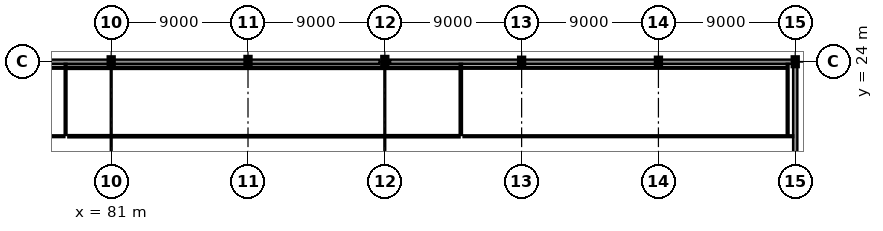
"""IFC4 building model, lengths in metres.
Left out: names, types, materials, properties, quantities, classifications, styles, units other than length and angle.
Written with IfcOpenShell. Run it as: python <this file> out.ifc"""

import sys

from ifc_helpers import new_model, si_unit, direction, frame, frame_2d, origin, origin_2d, place, context, subcontext, project, spatial, rectangle, i_section, extrude, element, fill, save


model = new_model("IFC4")
c1 = context("Model", 3, precision=1e-05, world=origin(), true_north=direction((0.0, 1.0)))
c2 = subcontext(c1, "Body", "Model", "MODEL_VIEW")
j1 = project(units=[si_unit("LENGTHUNIT", "METRE"), si_unit("PLANEANGLEUNIT", "RADIAN")], contexts=[c1])
p1 = place(None, origin())
s1 = spatial("IfcSite", under=j1, at=p1, CompositionType="ELEMENT")
p2 = place(p1, origin())
s2 = spatial("IfcBuilding", under=s1, at=p2, CompositionType="ELEMENT")
p3 = place(p2, frame((0.0, 0.0, 27.4)))
s3 = spatial("IfcBuildingStorey", under=s2, at=p3, CompositionType="ELEMENT", Elevation=27.4)
p4 = place(p3, frame((81.0, 24.0, 0.0), z_axis=(0.0, 0.0, 1.0), x_axis=(1.0, 0.0, 0.0)))
e1 = element("IfcColumn", 1, at=p4, inside=s3, PredefinedType="COLUMN", context=c2, shape_type="SweptSolid", body=[
    extrude(i_section(OverallWidth=0.3, OverallDepth=0.55, WebThickness=0.015, FlangeThickness=0.029, at=origin_2d()), origin(), (0.0, 0.0, 1.0), 4.0),
])
for number, where, z_axis, x_axis in (
    (2, (90.0, 24.0, 0.0), (0.0, 0.0, 1.0), (1.0, 0.0, 0.0)),
    (3, (99.0, 24.0, 0.0), (0.0, 0.0, 1.0), (0.0, 1.0, 0.0)),
):
    element("IfcColumn", number, at=place(p3, frame(where, z_axis=z_axis, x_axis=x_axis)), inside=s3, PredefinedType="COLUMN", context=c2, shape_type="SweptSolid", body=[
        extrude(i_section(OverallWidth=0.3, OverallDepth=0.6, WebThickness=0.015, FlangeThickness=0.03, at=origin_2d()), origin(), (0.0, 0.0, 1.0), 4.0),
    ])
for number, where, z_axis, x_axis in (
    (4, (108.0, 24.0, 0.0), (0.0, 0.0, 1.0), (1.0, 0.0, 0.0)),
    (5, (117.0, 24.0, 0.0), (0.0, 0.0, 1.0), (1.0, 0.0, 0.0)),
):
    element("IfcColumn", number, at=place(p3, frame(where, z_axis=z_axis, x_axis=x_axis)), inside=s3, PredefinedType="COLUMN", context=c2, shape_type="SweptSolid", body=[
        extrude(i_section(OverallWidth=0.3, OverallDepth=0.5, WebThickness=0.014, FlangeThickness=0.028, at=origin_2d()), origin(), (0.0, 0.0, 1.0), 4.0),
    ])
p5 = place(p3, frame((126.0, 24.0, 0.0), z_axis=(0.0, 0.0, 1.0), x_axis=(1.0, 0.0, 0.0)))
e6 = element("IfcColumn", 6, at=p5, inside=s3, PredefinedType="COLUMN", context=c2, shape_type="SweptSolid", body=[
    extrude(i_section(OverallWidth=0.3, OverallDepth=0.55, WebThickness=0.015, FlangeThickness=0.029, at=origin_2d()), origin(), (0.0, 0.0, 1.0), 4.0),
])
p6 = place(p3, frame((80.942, 24.0, 0.0), z_axis=(0.0, 0.0, 1.0), x_axis=(-1.0, 0.0, 0.0)))
e7 = element("IfcWall", 7, at=p6, inside=s3, PredefinedType="SOLIDWALL", context=c2, shape_type="SweptSolid", body=[
    extrude(rectangle(XDim=8.934, YDim=0.28, at=frame_2d((4.467, 0.0))), origin(), (0.0, 0.0, 1.0), 3.305),
])
p7 = place(p6, frame((1.302, 0.0, 1.05)))
e8 = element("IfcOpeningElement", 8, at=p7, cuts=e7, PredefinedType="OPENING", context=c2, shape_type="SweptSolid", body=[
    extrude(rectangle(XDim=1.3, YDim=1.3, at=frame_2d((0.65, 0.65))), frame((0.0, 0.155, 0.0), z_axis=(0.0, -1.0, 0.0), x_axis=(1.0, 0.0, 0.0)), (0.0, 0.0, 1.0), 0.31),
])
p8 = place(p6, frame((5.604, 0.0, 1.05)))
e9 = element("IfcOpeningElement", 9, at=p8, cuts=e7, PredefinedType="OPENING", context=c2, shape_type="SweptSolid", body=[
    extrude(rectangle(XDim=1.3, YDim=1.3, at=frame_2d((0.65, 0.65))), frame((0.0, 0.155, 0.0), z_axis=(0.0, -1.0, 0.0), x_axis=(1.0, 0.0, 0.0)), (0.0, 0.0, 1.0), 0.31),
])
p9 = place(p3, frame((98.652, 24.0, 0.0), z_axis=(0.0, 0.0, 1.0), x_axis=(-1.0, 0.0, 0.0)))
e10 = element("IfcWall", 10, at=p9, inside=s3, PredefinedType="SOLIDWALL", context=c2, shape_type="SweptSolid", body=[
    extrude(rectangle(XDim=8.644, YDim=0.28, at=frame_2d((4.322, 0.0))), origin(), (0.0, 0.0, 1.0), 3.305),
])
p10 = place(p9, frame((1.943, 0.0, 1.05)))
e11 = element("IfcOpeningElement", 11, at=p10, cuts=e10, PredefinedType="OPENING", context=c2, shape_type="SweptSolid", body=[
    extrude(rectangle(XDim=1.3, YDim=1.3, at=frame_2d((0.65, 0.65))), frame((0.0, 0.155, 0.0), z_axis=(0.0, -1.0, 0.0), x_axis=(1.0, 0.0, 0.0)), (0.0, 0.0, 1.0), 0.31),
])
p11 = place(p9, frame((5.401, 0.0, 1.05)))
e12 = element("IfcOpeningElement", 12, at=p11, cuts=e10, PredefinedType="OPENING", context=c2, shape_type="SweptSolid", body=[
    extrude(rectangle(XDim=1.3, YDim=1.3, at=frame_2d((0.65, 0.65))), frame((0.0, 0.155, 0.0), z_axis=(0.0, -1.0, 0.0), x_axis=(1.0, 0.0, 0.0)), (0.0, 0.0, 1.0), 0.31),
])
p12 = place(p3, frame((89.992, 24.0, 0.0), z_axis=(0.0, 0.0, 1.0), x_axis=(-1.0, 0.0, 0.0)))
e13 = element("IfcWall", 13, at=p12, inside=s3, PredefinedType="SOLIDWALL", context=c2, shape_type="SweptSolid", body=[
    extrude(rectangle(XDim=8.934, YDim=0.28, at=frame_2d((4.467, 0.0))), origin(), (0.0, 0.0, 1.0), 3.305),
])
p13 = place(p12, frame((2.03, 0.0, 1.05)))
e14 = element("IfcOpeningElement", 14, at=p13, cuts=e13, PredefinedType="OPENING", context=c2, shape_type="SweptSolid", body=[
    extrude(rectangle(XDim=1.3, YDim=1.3, at=frame_2d((0.65, 0.65))), frame((0.0, 0.155, 0.0), z_axis=(0.0, -1.0, 0.0), x_axis=(1.0, 0.0, 0.0)), (0.0, 0.0, 1.0), 0.31),
])
p14 = place(p12, frame((5.604, 0.0, 1.05)))
e15 = element("IfcOpeningElement", 15, at=p14, cuts=e13, PredefinedType="OPENING", context=c2, shape_type="SweptSolid", body=[
    extrude(rectangle(XDim=1.3, YDim=1.3, at=frame_2d((0.65, 0.65))), frame((0.0, 0.155, 0.0), z_axis=(0.0, -1.0, 0.0), x_axis=(1.0, 0.0, 0.0)), (0.0, 0.0, 1.0), 0.31),
])
p15 = place(p3, frame((126.0, 12.138, 0.0), z_axis=(0.0, 0.0, 1.0), x_axis=(0.0, 1.0, 0.0)))
e16 = element("IfcWall", 16, at=p15, inside=s3, PredefinedType="SOLIDWALL", context=c2, shape_type="SweptSolid", body=[
    extrude(rectangle(XDim=11.589, YDim=0.28, at=frame_2d((5.794, 0.0))), origin(), (0.0, 0.0, 1.0), 3.305),
])
p16 = place(p15, frame((2.022, 0.0, 1.05)))
e17 = element("IfcOpeningElement", 17, at=p16, cuts=e16, PredefinedType="OPENING", context=c2, shape_type="SweptSolid", body=[
    extrude(rectangle(XDim=1.3, YDim=1.3, at=frame_2d((0.65, 0.65))), frame((0.0, 0.155, 0.0), z_axis=(0.0, -1.0, 0.0), x_axis=(1.0, 0.0, 0.0)), (0.0, 0.0, 1.0), 0.31),
])
p17 = place(p15, frame((7.462, 0.0, 1.05)))
e18 = element("IfcOpeningElement", 18, at=p17, cuts=e16, PredefinedType="OPENING", context=c2, shape_type="SweptSolid", body=[
    extrude(rectangle(XDim=1.3, YDim=1.3, at=frame_2d((0.65, 0.65))), frame((0.0, 0.155, 0.0), z_axis=(0.0, -1.0, 0.0), x_axis=(1.0, 0.0, 0.0)), (0.0, 0.0, 1.0), 0.31),
])
p18 = place(p3, frame((125.992, 24.0, 0.0), z_axis=(0.0, 0.0, 1.0), x_axis=(-1.0, 0.0, 0.0)))
e19 = element("IfcWall", 19, at=p18, inside=s3, PredefinedType="SOLIDWALL", context=c2, shape_type="SweptSolid", body=[
    extrude(rectangle(XDim=8.984, YDim=0.28, at=frame_2d((4.492, 0.0))), origin(), (0.0, 0.0, 1.0), 3.305),
])
p19 = place(p18, frame((2.045, 0.0, 1.05)))
e20 = element("IfcOpeningElement", 20, at=p19, cuts=e19, PredefinedType="OPENING", context=c2, shape_type="SweptSolid", body=[
    extrude(rectangle(XDim=1.3, YDim=1.3, at=frame_2d((0.65, 0.65))), frame((0.0, 0.155, 0.0), z_axis=(0.0, -1.0, 0.0), x_axis=(1.0, 0.0, 0.0)), (0.0, 0.0, 1.0), 0.31),
])
p20 = place(p18, frame((5.639, 0.0, 1.05)))
e21 = element("IfcOpeningElement", 21, at=p20, cuts=e19, PredefinedType="OPENING", context=c2, shape_type="SweptSolid", body=[
    extrude(rectangle(XDim=1.3, YDim=1.3, at=frame_2d((0.65, 0.65))), frame((0.0, 0.155, 0.0), z_axis=(0.0, -1.0, 0.0), x_axis=(1.0, 0.0, 0.0)), (0.0, 0.0, 1.0), 0.31),
])
p21 = place(p3, frame((116.992, 24.0, 0.0), z_axis=(0.0, 0.0, 1.0), x_axis=(-1.0, 0.0, 0.0)))
e22 = element("IfcWall", 22, at=p21, inside=s3, PredefinedType="SOLIDWALL", context=c2, shape_type="SweptSolid", body=[
    extrude(rectangle(XDim=8.984, YDim=0.28, at=frame_2d((4.492, 0.0))), origin(), (0.0, 0.0, 1.0), 3.305),
])
p22 = place(p21, frame((2.045, 0.0, 1.05)))
e23 = element("IfcOpeningElement", 23, at=p22, cuts=e22, PredefinedType="OPENING", context=c2, shape_type="SweptSolid", body=[
    extrude(rectangle(XDim=1.3, YDim=1.3, at=frame_2d((0.65, 0.65))), frame((0.0, 0.155, 0.0), z_axis=(0.0, -1.0, 0.0), x_axis=(1.0, 0.0, 0.0)), (0.0, 0.0, 1.0), 0.31),
])
p23 = place(p21, frame((5.639, 0.0, 1.05)))
e24 = element("IfcOpeningElement", 24, at=p23, cuts=e22, PredefinedType="OPENING", context=c2, shape_type="SweptSolid", body=[
    extrude(rectangle(XDim=1.3, YDim=1.3, at=frame_2d((0.65, 0.65))), frame((0.0, 0.155, 0.0), z_axis=(0.0, -1.0, 0.0), x_axis=(1.0, 0.0, 0.0)), (0.0, 0.0, 1.0), 0.31),
])
p24 = place(p3, frame((107.992, 24.0, 0.0), z_axis=(0.0, 0.0, 1.0), x_axis=(-1.0, 0.0, 0.0)))
e25 = element("IfcWall", 25, at=p24, inside=s3, PredefinedType="SOLIDWALL", context=c2, shape_type="SweptSolid", body=[
    extrude(rectangle(XDim=8.644, YDim=0.28, at=frame_2d((4.322, 0.0))), origin(), (0.0, 0.0, 1.0), 3.305),
])
p25 = place(p24, frame((1.943, 0.0, 1.05)))
e26 = element("IfcOpeningElement", 26, at=p25, cuts=e25, PredefinedType="OPENING", context=c2, shape_type="SweptSolid", body=[
    extrude(rectangle(XDim=1.3, YDim=1.3, at=frame_2d((0.65, 0.65))), frame((0.0, 0.155, 0.0), z_axis=(0.0, -1.0, 0.0), x_axis=(1.0, 0.0, 0.0)), (0.0, 0.0, 1.0), 0.31),
])
p26 = place(p24, frame((5.401, 0.0, 1.05)))
e27 = element("IfcOpeningElement", 27, at=p26, cuts=e25, PredefinedType="OPENING", context=c2, shape_type="SweptSolid", body=[
    extrude(rectangle(XDim=1.3, YDim=1.3, at=frame_2d((0.65, 0.65))), frame((0.0, 0.155, 0.0), z_axis=(0.0, -1.0, 0.0), x_axis=(1.0, 0.0, 0.0)), (0.0, 0.0, 1.0), 0.31),
])
p27 = place(p3, frame((77.92, 19.1, 0.0), z_axis=(0.0, 0.0, 1.0), x_axis=(-1.0, 0.0, 0.0)))
e28 = element("IfcWall", 28, at=p27, inside=s3, PredefinedType="PARTITIONING", context=c2, shape_type="SweptSolid", body=[
    extrude(rectangle(XDim=45.385, YDim=0.12, at=frame_2d((22.692, 0.0))), origin(), (0.0, 0.0, 1.0), 3.64),
])
p28 = place(p27, frame((22.218, 0.0, 0.0)))
e29 = element("IfcOpeningElement", 29, at=p28, cuts=e28, PredefinedType="OPENING", context=c2, shape_type="SweptSolid", body=[
    extrude(rectangle(XDim=0.95, YDim=2.15, at=frame_2d((0.475, 1.075))), frame((0.0, 0.075, 0.0), z_axis=(0.0, -1.0, 0.0), x_axis=(1.0, 0.0, 0.0)), (0.0, 0.0, 1.0), 0.15),
])
p29 = place(p3, frame((32.955, 23.6, 0.0), z_axis=(0.0, 0.0, 1.0), x_axis=(1.0, 0.0, 0.0)))
e30 = element("IfcWall", 30, at=p29, inside=s3, PredefinedType="PARTITIONING", context=c2, shape_type="SweptSolid", body=[
    extrude(rectangle(XDim=44.965, YDim=0.12, at=frame_2d((22.482, 0.0))), origin(), (0.0, 0.0, 1.0), 3.64),
])
p30 = place(p3, frame((78.0, 23.865, 0.0), z_axis=(0.0, 0.0, 1.0), x_axis=(0.0, -1.0, 0.0)))
e31 = element("IfcWall", 31, at=p30, inside=s3, PredefinedType="PARTITIONING", context=c2, shape_type="SweptSolid", body=[
    extrude(rectangle(XDim=4.685, YDim=0.12, at=frame_2d((2.343, 0.0))), origin(), (0.0, 0.0, 1.0), 3.64),
])
p31 = place(p3, frame((78.055, 23.6, 0.0), z_axis=(0.0, 0.0, 1.0), x_axis=(1.0, 0.0, 0.0)))
e32 = element("IfcWall", 32, at=p31, inside=s3, PredefinedType="PARTITIONING", context=c2, shape_type="SweptSolid", body=[
    extrude(rectangle(XDim=25.865, YDim=0.15, at=frame_2d((12.933, 0.0))), origin(), (0.0, 0.0, 1.0), 3.64),
])
p32 = place(p3, frame((104.0, 23.865, 0.0), z_axis=(0.0, 0.0, 1.0), x_axis=(0.0, -1.0, 0.0)))
e33 = element("IfcWall", 33, at=p32, inside=s3, PredefinedType="PARTITIONING", context=c2, shape_type="SweptSolid", body=[
    extrude(rectangle(XDim=4.685, YDim=0.15, at=frame_2d((2.343, 0.0))), origin(), (0.0, 0.0, 1.0), 3.64),
])
p33 = place(p3, frame((103.92, 19.1, 0.0), z_axis=(0.0, 0.0, 1.0), x_axis=(-1.0, 0.0, 0.0)))
e34 = element("IfcWall", 34, at=p33, inside=s3, PredefinedType="PARTITIONING", context=c2, shape_type="SweptSolid", body=[
    extrude(rectangle(XDim=25.74, YDim=0.15, at=frame_2d((12.87, 0.0))), origin(), (0.0, 0.0, 1.0), 3.64),
])
p34 = place(p33, frame((12.345, 0.0, 0.0)))
e35 = element("IfcOpeningElement", 35, at=p34, cuts=e34, PredefinedType="OPENING", context=c2, shape_type="SweptSolid", body=[
    extrude(rectangle(XDim=1.05, YDim=2.25, at=frame_2d((0.525, 1.125))), frame((0.0, 0.09, 0.0), z_axis=(0.0, -1.0, 0.0), x_axis=(1.0, 0.0, 0.0)), (0.0, 0.0, 1.0), 0.18),
])
p35 = place(p3, frame((125.5, 23.865, 0.0), z_axis=(0.0, 0.0, 1.0), x_axis=(0.0, -1.0, 0.0)))
e36 = element("IfcWall", 36, at=p35, inside=s3, PredefinedType="PARTITIONING", context=c2, shape_type="SweptSolid", body=[
    extrude(rectangle(XDim=4.685, YDim=0.12, at=frame_2d((2.343, 0.0))), origin(), (0.0, 0.0, 1.0), 3.64),
])
p36 = place(p3, frame((125.865, 19.1, 0.0), z_axis=(0.0, 0.0, 1.0), x_axis=(-1.0, 0.0, 0.0)))
e37 = element("IfcWall", 37, at=p36, inside=s3, PredefinedType="PARTITIONING", context=c2, shape_type="SweptSolid", body=[
    extrude(rectangle(XDim=21.685, YDim=0.12, at=frame_2d((10.843, 0.0))), origin(), (0.0, 0.0, 1.0), 3.64),
])
p37 = place(p36, frame((10.392, 0.0, 0.0)))
e38 = element("IfcOpeningElement", 38, at=p37, cuts=e37, PredefinedType="OPENING", context=c2, shape_type="SweptSolid", body=[
    extrude(rectangle(XDim=0.9, YDim=2.1, at=frame_2d((0.45, 1.05))), frame((0.0, 0.075, 0.0), z_axis=(0.0, -1.0, 0.0), x_axis=(1.0, 0.0, 0.0)), (0.0, 0.0, 1.0), 0.15),
])
p38 = place(p3, frame((104.07, 23.6, 0.0), z_axis=(0.0, 0.0, 1.0), x_axis=(1.0, 0.0, 0.0)))
e39 = element("IfcWall", 39, at=p38, inside=s3, PredefinedType="PARTITIONING", context=c2, shape_type="SweptSolid", body=[
    extrude(rectangle(XDim=21.375, YDim=0.12, at=frame_2d((10.688, 0.0))), origin(), (0.0, 0.0, 1.0), 3.64),
])
p39 = place(p7, origin())
e40 = element("IfcWindow", 40, at=p39, inside=s3, PartitioningType="SINGLE_PANEL", PredefinedType="WINDOW", context=c2, shape_type="SweptSolid", body=[
    extrude(rectangle(XDim=1.3, YDim=1.3, at=frame_2d((0.65, 0.65))), frame((0.0, 0.03, 0.0), z_axis=(0.0, -1.0, 0.0), x_axis=(1.0, 0.0, 0.0)), (0.0, 0.0, 1.0), 0.06),
])
fill(e8, e40)
p40 = place(p10, origin())
e41 = element("IfcWindow", 41, at=p40, inside=s3, PartitioningType="SINGLE_PANEL", PredefinedType="WINDOW", context=c2, shape_type="SweptSolid", body=[
    extrude(rectangle(XDim=1.3, YDim=1.3, at=frame_2d((0.65, 0.65))), frame((0.0, 0.03, 0.0), z_axis=(0.0, -1.0, 0.0), x_axis=(1.0, 0.0, 0.0)), (0.0, 0.0, 1.0), 0.06),
])
fill(e11, e41)
p41 = place(p11, origin())
e42 = element("IfcWindow", 42, at=p41, inside=s3, PartitioningType="SINGLE_PANEL", PredefinedType="WINDOW", context=c2, shape_type="SweptSolid", body=[
    extrude(rectangle(XDim=1.3, YDim=1.3, at=frame_2d((0.65, 0.65))), frame((0.0, 0.03, 0.0), z_axis=(0.0, -1.0, 0.0), x_axis=(1.0, 0.0, 0.0)), (0.0, 0.0, 1.0), 0.06),
])
fill(e12, e42)
p42 = place(p13, origin())
e43 = element("IfcWindow", 43, at=p42, inside=s3, PartitioningType="SINGLE_PANEL", PredefinedType="WINDOW", context=c2, shape_type="SweptSolid", body=[
    extrude(rectangle(XDim=1.3, YDim=1.3, at=frame_2d((0.65, 0.65))), frame((0.0, 0.03, 0.0), z_axis=(0.0, -1.0, 0.0), x_axis=(1.0, 0.0, 0.0)), (0.0, 0.0, 1.0), 0.06),
])
fill(e14, e43)
p43 = place(p14, origin())
e44 = element("IfcWindow", 44, at=p43, inside=s3, PartitioningType="SINGLE_PANEL", PredefinedType="WINDOW", context=c2, shape_type="SweptSolid", body=[
    extrude(rectangle(XDim=1.3, YDim=1.3, at=frame_2d((0.65, 0.65))), frame((0.0, 0.03, 0.0), z_axis=(0.0, -1.0, 0.0), x_axis=(1.0, 0.0, 0.0)), (0.0, 0.0, 1.0), 0.06),
])
fill(e15, e44)
p44 = place(p17, origin())
e45 = element("IfcWindow", 45, at=p44, inside=s3, PartitioningType="SINGLE_PANEL", PredefinedType="WINDOW", context=c2, shape_type="SweptSolid", body=[
    extrude(rectangle(XDim=1.3, YDim=1.3, at=frame_2d((0.65, 0.65))), frame((0.0, 0.03, 0.0), z_axis=(0.0, -1.0, 0.0), x_axis=(1.0, 0.0, 0.0)), (0.0, 0.0, 1.0), 0.06),
])
fill(e18, e45)
p45 = place(p19, origin())
e46 = element("IfcWindow", 46, at=p45, inside=s3, PartitioningType="SINGLE_PANEL", PredefinedType="WINDOW", context=c2, shape_type="SweptSolid", body=[
    extrude(rectangle(XDim=1.3, YDim=1.3, at=frame_2d((0.65, 0.65))), frame((0.0, 0.03, 0.0), z_axis=(0.0, -1.0, 0.0), x_axis=(1.0, 0.0, 0.0)), (0.0, 0.0, 1.0), 0.06),
])
fill(e20, e46)
p46 = place(p20, origin())
e47 = element("IfcWindow", 47, at=p46, inside=s3, PartitioningType="SINGLE_PANEL", PredefinedType="WINDOW", context=c2, shape_type="SweptSolid", body=[
    extrude(rectangle(XDim=1.3, YDim=1.3, at=frame_2d((0.65, 0.65))), frame((0.0, 0.03, 0.0), z_axis=(0.0, -1.0, 0.0), x_axis=(1.0, 0.0, 0.0)), (0.0, 0.0, 1.0), 0.06),
])
fill(e21, e47)
p47 = place(p22, origin())
e48 = element("IfcWindow", 48, at=p47, inside=s3, PartitioningType="SINGLE_PANEL", PredefinedType="WINDOW", context=c2, shape_type="SweptSolid", body=[
    extrude(rectangle(XDim=1.3, YDim=1.3, at=frame_2d((0.65, 0.65))), frame((0.0, 0.03, 0.0), z_axis=(0.0, -1.0, 0.0), x_axis=(1.0, 0.0, 0.0)), (0.0, 0.0, 1.0), 0.06),
])
fill(e23, e48)
p48 = place(p23, origin())
e49 = element("IfcWindow", 49, at=p48, inside=s3, PartitioningType="SINGLE_PANEL", PredefinedType="WINDOW", context=c2, shape_type="SweptSolid", body=[
    extrude(rectangle(XDim=1.3, YDim=1.3, at=frame_2d((0.65, 0.65))), frame((0.0, 0.03, 0.0), z_axis=(0.0, -1.0, 0.0), x_axis=(1.0, 0.0, 0.0)), (0.0, 0.0, 1.0), 0.06),
])
fill(e24, e49)
p49 = place(p25, origin())
e50 = element("IfcWindow", 50, at=p49, inside=s3, PartitioningType="SINGLE_PANEL", PredefinedType="WINDOW", context=c2, shape_type="SweptSolid", body=[
    extrude(rectangle(XDim=1.3, YDim=1.3, at=frame_2d((0.65, 0.65))), frame((0.0, 0.03, 0.0), z_axis=(0.0, -1.0, 0.0), x_axis=(1.0, 0.0, 0.0)), (0.0, 0.0, 1.0), 0.06),
])
fill(e26, e50)
p50 = place(p26, origin())
e51 = element("IfcWindow", 51, at=p50, inside=s3, PartitioningType="SINGLE_PANEL", PredefinedType="WINDOW", context=c2, shape_type="SweptSolid", body=[
    extrude(rectangle(XDim=1.3, YDim=1.3, at=frame_2d((0.65, 0.65))), frame((0.0, 0.03, 0.0), z_axis=(0.0, -1.0, 0.0), x_axis=(1.0, 0.0, 0.0)), (0.0, 0.0, 1.0), 0.06),
])
fill(e27, e51)
p51 = place(p34, origin())
e52 = element("IfcDoor", 52, at=p51, inside=s3, OperationType="SINGLE_SWING_LEFT", PredefinedType="DOOR", context=c2, shape_type="SweptSolid", body=[
    extrude(rectangle(XDim=1.05, YDim=2.25, at=frame_2d((0.525, 1.125))), frame((0.0, 0.025, 0.0), z_axis=(0.0, -1.0, 0.0), x_axis=(1.0, 0.0, 0.0)), (0.0, 0.0, 1.0), 0.05),
])
fill(e35, e52)
p52 = place(p37, frame((0.9, 0.0, 0.0), z_axis=(0.0, 0.0, 1.0), x_axis=(-1.0, 0.0, 0.0)))
e53 = element("IfcDoor", 53, at=p52, inside=s3, OperationType="SINGLE_SWING_RIGHT", PredefinedType="DOOR", context=c2, shape_type="SweptSolid", body=[
    extrude(rectangle(XDim=0.9, YDim=2.1, at=frame_2d((0.45, 1.05))), frame((0.0, 0.025, 0.0), z_axis=(0.0, -1.0, 0.0), x_axis=(1.0, 0.0, 0.0)), (0.0, 0.0, 1.0), 0.05),
])
fill(e38, e53)
save(model, sys.argv[1])
